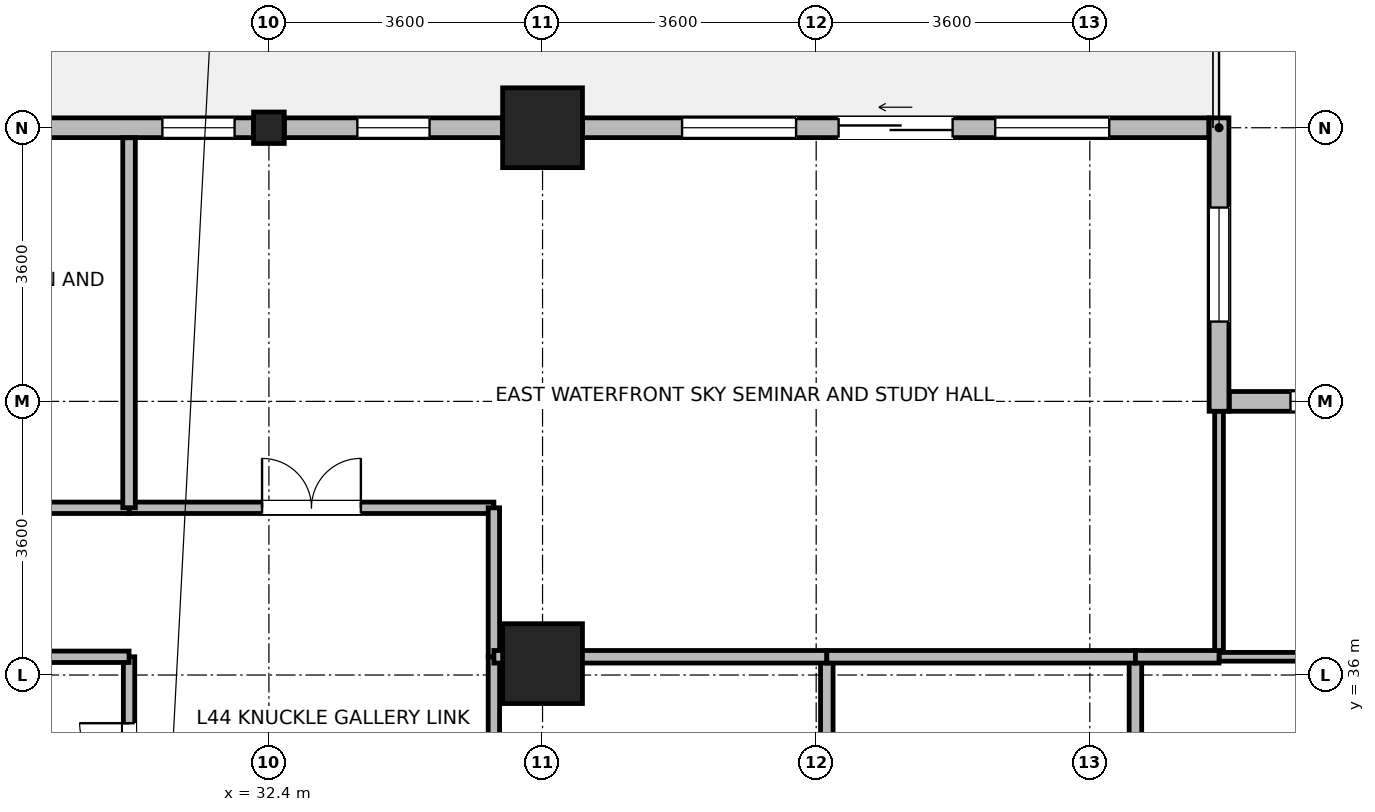
"""IFC4 building model, lengths in metres.
Left out: names, types, materials, properties, quantities, classifications, styles, units other than length and angle.
Written with IfcOpenShell. Run it as: python <this file> out.ifc"""

import sys

from ifc_helpers import new_model, si_unit, direction, frame, frame_2d, origin, origin_2d, place, context, subcontext, project, spatial, rectangle, i_section, extrude, source, transform, mapped, element, fill, save


model = new_model("IFC4")
c1 = context("Model", 3, precision=1e-05, world=origin(), true_north=direction((0.0, 1.0)))
c2 = subcontext(c1, "Body", "Model", "MODEL_VIEW")
j1 = project(units=[si_unit("LENGTHUNIT", "METRE"), si_unit("PLANEANGLEUNIT", "RADIAN")], contexts=[c1])
p1 = place(None, origin())
s1 = spatial("IfcSite", under=j1, at=p1, CompositionType="ELEMENT")
p2 = place(p1, origin())
s2 = spatial("IfcBuilding", under=s1, at=p2, CompositionType="ELEMENT")
p3 = place(p2, frame((0.0, 0.0, 173.5)))
s3 = spatial("IfcBuildingStorey", under=s2, at=p3, CompositionType="ELEMENT", Elevation=173.5)
m1 = source(origin(), c2, "Body", "SweptSolid", [
    extrude(rectangle(XDim=1.05, YDim=1.05, at=origin_2d()), origin(), (0.0, 0.0, 1.0), 3.7),
])
for number, where, z_axis, x_axis in (
    (1, (36.0, 43.2, 0.0), (0.0, 0.0, 1.0), (1.0, 0.0, 0.0)),
    (2, (36.0, 36.15, 0.0), (0.0, 0.0, 1.0), (1.0, 0.0, 0.0)),
):
    element("IfcColumn", number, at=place(p3, frame(where, z_axis=z_axis, x_axis=x_axis)), inside=s3, PredefinedType="COLUMN", context=c2, shape_type="MappedRepresentation", body=[
        mapped(m1, transform((0.0, 0.0, 0.0), x_axis=(1.0, 0.0, 0.0), y_axis=(0.0, 1.0, 0.0), z_axis=(0.0, 0.0, 1.0), scale=1.0)),
    ])
m2 = source(origin(), c2, "Body", "SweptSolid", [
    extrude(i_section(OverallWidth=0.404, OverallDepth=0.414, WebThickness=0.021, FlangeThickness=0.028, FilletRadius=0.015, at=origin_2d()), origin(), (0.0, 0.0, 1.0), 3.7),
])
p4 = place(p3, frame((32.4, 43.2, 0.0), z_axis=(0.0, 0.0, 1.0), x_axis=(1.0, 0.0, 0.0)))
e3 = element("IfcColumn", 3, at=p4, inside=s3, PredefinedType="COLUMN", context=c2, shape_type="MappedRepresentation", body=[
    mapped(m2, transform((0.0, 0.0, 0.0), x_axis=(1.0, 0.0, 0.0), y_axis=(0.0, 1.0, 0.0), z_axis=(0.0, 0.0, 1.0), scale=1.0)),
])
p5 = place(p3, frame((45.035, 39.6, 0.0), z_axis=(0.0, 0.0, 1.0), x_axis=(1.0, 0.0, 0.0)))
e4 = element("IfcWall", 4, at=p5, inside=s3, PredefinedType="STANDARD", context=c2, shape_type="SweptSolid", body=[
    extrude(rectangle(XDim=9.33, YDim=0.26, at=frame_2d((4.665, 0.0))), origin(), (0.0, 0.0, 1.0), 3.44),
])
p6 = place(p5, frame((0.805, 0.0, 0.85)))
e5 = element("IfcOpeningElement", 5, at=p6, cuts=e4, PredefinedType="OPENING", context=c2, shape_type="SweptSolid", body=[
    extrude(rectangle(XDim=1.5, YDim=1.85, at=frame_2d((0.75, 0.925))), frame((0.0, 0.14, 0.0), z_axis=(0.0, -1.0, 0.0), x_axis=(1.0, 0.0, 0.0)), (0.0, 0.0, 1.0), 0.28),
])
p7 = place(p5, frame((3.915, 0.0, 0.85)))
e6 = element("IfcOpeningElement", 6, at=p7, cuts=e4, PredefinedType="OPENING", context=c2, shape_type="SweptSolid", body=[
    extrude(rectangle(XDim=1.5, YDim=1.85, at=frame_2d((0.75, 0.925))), frame((0.0, 0.14, 0.0), z_axis=(0.0, -1.0, 0.0), x_axis=(1.0, 0.0, 0.0)), (0.0, 0.0, 1.0), 0.28),
])
p8 = place(p5, frame((7.025, 0.0, 0.85)))
e7 = element("IfcOpeningElement", 7, at=p8, cuts=e4, PredefinedType="OPENING", context=c2, shape_type="SweptSolid", body=[
    extrude(rectangle(XDim=1.5, YDim=1.85, at=frame_2d((0.75, 0.925))), frame((0.0, 0.14, 0.0), z_axis=(0.0, -1.0, 0.0), x_axis=(1.0, 0.0, 0.0)), (0.0, 0.0, 1.0), 0.28),
])
p9 = place(p3, frame((44.9, 43.33, 0.0), z_axis=(0.0, 0.0, 1.0), x_axis=(0.0, -1.0, 0.0)))
e8 = element("IfcWall", 8, at=p9, inside=s3, PredefinedType="STANDARD", context=c2, shape_type="SweptSolid", body=[
    extrude(rectangle(XDim=3.86, YDim=0.26, at=frame_2d((1.93, 0.0))), origin(), (0.0, 0.0, 1.0), 3.44),
])
p10 = place(p9, frame((1.18, 0.0, 0.85)))
e9 = element("IfcOpeningElement", 9, at=p10, cuts=e8, PredefinedType="OPENING", context=c2, shape_type="SweptSolid", body=[
    extrude(rectangle(XDim=1.5, YDim=1.85, at=frame_2d((0.75, 0.925))), frame((0.0, 0.14, 0.0), z_axis=(0.0, -1.0, 0.0), x_axis=(1.0, 0.0, 0.0)), (0.0, 0.0, 1.0), 0.28),
])
p11 = place(p3, frame((36.526, 43.2, 0.0), z_axis=(0.0, 0.0, 1.0), x_axis=(1.0, 0.0, 0.0)))
e10 = element("IfcWall", 10, at=p11, inside=s3, PredefinedType="STANDARD", context=c2, shape_type="SweptSolid", body=[
    extrude(rectangle(XDim=8.239, YDim=0.26, at=frame_2d((4.12, 0.0))), origin(), (0.0, 0.0, 1.0), 2.99),
])
p12 = place(p11, frame((3.369, 0.0, 0.0)))
e11 = element("IfcOpeningElement", 11, at=p12, cuts=e10, PredefinedType="OPENING", context=c2, shape_type="SweptSolid", body=[
    extrude(rectangle(XDim=1.5, YDim=2.15, at=frame_2d((0.75, 1.075))), frame((0.0, 0.14, 0.0), z_axis=(0.0, -1.0, 0.0), x_axis=(1.0, 0.0, 0.0)), (0.0, 0.0, 1.0), 0.28),
])
p13 = place(p11, frame((1.31, 0.0, 0.85)))
e12 = element("IfcOpeningElement", 12, at=p13, cuts=e10, PredefinedType="OPENING", context=c2, shape_type="SweptSolid", body=[
    extrude(rectangle(XDim=1.5, YDim=1.85, at=frame_2d((0.75, 0.925))), frame((0.0, 0.14, 0.0), z_axis=(0.0, -1.0, 0.0), x_axis=(1.0, 0.0, 0.0)), (0.0, 0.0, 1.0), 0.28),
])
p14 = place(p11, frame((5.429, 0.0, 0.85)))
e13 = element("IfcOpeningElement", 13, at=p14, cuts=e10, PredefinedType="OPENING", context=c2, shape_type="SweptSolid", body=[
    extrude(rectangle(XDim=1.5, YDim=1.85, at=frame_2d((0.75, 0.925))), frame((0.0, 0.14, 0.0), z_axis=(0.0, -1.0, 0.0), x_axis=(1.0, 0.0, 0.0)), (0.0, 0.0, 1.0), 0.28),
])
p15 = place(p3, frame((32.603, 43.2, 0.0), z_axis=(0.0, 0.0, 1.0), x_axis=(1.0, 0.0, 0.0)))
e14 = element("IfcWall", 14, at=p15, inside=s3, PredefinedType="STANDARD", context=c2, shape_type="SweptSolid", body=[
    extrude(rectangle(XDim=2.871, YDim=0.26, at=frame_2d((1.436, 0.0))), origin(), (0.0, 0.0, 1.0), 2.99),
])
p16 = place(p15, frame((0.96, 0.0, 0.85)))
e15 = element("IfcOpeningElement", 15, at=p16, cuts=e14, PredefinedType="OPENING", context=c2, shape_type="SweptSolid", body=[
    extrude(rectangle(XDim=0.95, YDim=1.75, at=frame_2d((0.475, 0.875))), frame((0.0, 0.14, 0.0), z_axis=(0.0, -1.0, 0.0), x_axis=(1.0, 0.0, 0.0)), (0.0, 0.0, 1.0), 0.28),
])
p17 = place(p3, frame((29.326, 43.2, 0.0), z_axis=(0.0, 0.0, 1.0), x_axis=(1.0, 0.0, 0.0)))
e16 = element("IfcWall", 16, at=p17, inside=s3, PredefinedType="STANDARD", context=c2, shape_type="SweptSolid", body=[
    extrude(rectangle(XDim=2.871, YDim=0.26, at=frame_2d((1.436, 0.0))), origin(), (0.0, 0.0, 1.0), 2.99),
])
p18 = place(p17, frame((1.673, 0.0, 0.85)))
e17 = element("IfcOpeningElement", 17, at=p18, cuts=e16, PredefinedType="OPENING", context=c2, shape_type="SweptSolid", body=[
    extrude(rectangle(XDim=0.95, YDim=1.75, at=frame_2d((0.475, 0.875))), frame((0.0, 0.14, 0.0), z_axis=(0.0, -1.0, 0.0), x_axis=(1.0, 0.0, 0.0)), (0.0, 0.0, 1.0), 0.28),
])
p19 = place(p3, frame((35.36, 28.56, 0.0), z_axis=(0.0, 0.0, 1.0), x_axis=(0.0, 1.0, 0.0)))
e18 = element("IfcWall", 18, at=p19, inside=s3, PredefinedType="PARTITIONING", context=c2, shape_type="SweptSolid", body=[
    extrude(rectangle(XDim=7.68, YDim=0.15, at=frame_2d((3.84, 0.0))), origin(), (0.0, 0.0, 1.0), 3.44),
])
p20 = place(p19, frame((3.19, 0.0, 0.0)))
e19 = element("IfcOpeningElement", 19, at=p20, cuts=e18, PredefinedType="OPENING", context=c2, shape_type="SweptSolid", body=[
    extrude(rectangle(XDim=1.3, YDim=2.12, at=frame_2d((0.65, 1.06))), frame((0.0, 0.085, 0.0), z_axis=(0.0, -1.0, 0.0), x_axis=(1.0, 0.0, 0.0)), (0.0, 0.0, 1.0), 0.17),
])
p21 = place(p3, frame((30.56, 38.2, 0.0), z_axis=(0.0, 0.0, 1.0), x_axis=(1.0, 0.0, 0.0)))
e20 = element("IfcWall", 20, at=p21, inside=s3, PredefinedType="PARTITIONING", context=c2, shape_type="SweptSolid", body=[
    extrude(rectangle(XDim=4.8, YDim=0.15, at=frame_2d((2.4, 0.0))), origin(), (0.0, 0.0, 1.0), 3.44),
])
p22 = place(p21, frame((1.75, 0.0, 0.0)))
e21 = element("IfcOpeningElement", 21, at=p22, cuts=e20, PredefinedType="OPENING", context=c2, shape_type="SweptSolid", body=[
    extrude(rectangle(XDim=1.3, YDim=2.12, at=frame_2d((0.65, 1.06))), frame((0.0, 0.085, 0.0), z_axis=(0.0, -1.0, 0.0), x_axis=(1.0, 0.0, 0.0)), (0.0, 0.0, 1.0), 0.17),
])
p23 = place(p3, frame((25.82, 38.2, 0.0), z_axis=(0.0, 0.0, 1.0), x_axis=(1.0, 0.0, 0.0)))
e22 = element("IfcWall", 22, at=p23, inside=s3, PredefinedType="PARTITIONING", context=c2, shape_type="SweptSolid", body=[
    extrude(rectangle(XDim=4.74, YDim=0.15, at=frame_2d((2.37, 0.0))), origin(), (0.0, 0.0, 1.0), 3.44),
])
p24 = place(p23, frame((1.92, 0.0, 0.0)))
e23 = element("IfcOpeningElement", 23, at=p24, cuts=e22, PredefinedType="OPENING", context=c2, shape_type="SweptSolid", body=[
    extrude(rectangle(XDim=0.9, YDim=2.08, at=frame_2d((0.45, 1.04))), frame((0.0, 0.085, 0.0), z_axis=(0.0, -1.0, 0.0), x_axis=(1.0, 0.0, 0.0)), (0.0, 0.0, 1.0), 0.17),
])
p25 = place(p3, frame((30.56, 33.7, 0.0), z_axis=(0.0, 0.0, 1.0), x_axis=(0.0, 1.0, 0.0)))
e24 = element("IfcWall", 24, at=p25, inside=s3, PredefinedType="PARTITIONING", context=c2, shape_type="SweptSolid", body=[
    extrude(rectangle(XDim=2.54, YDim=0.15, at=frame_2d((1.27, 0.0))), origin(), (0.0, 0.0, 1.0), 3.44),
])
p26 = place(p25, frame((0.366, 0.0, 0.0)))
e25 = element("IfcOpeningElement", 25, at=p26, cuts=e24, PredefinedType="OPENING", context=c2, shape_type="SweptSolid", body=[
    extrude(rectangle(XDim=1.3, YDim=2.12, at=frame_2d((0.65, 1.06))), frame((0.0, 0.085, 0.0), z_axis=(0.0, -1.0, 0.0), x_axis=(1.0, 0.0, 0.0)), (0.0, 0.0, 1.0), 0.17),
])
p27 = place(p3, frame((35.36, 36.24, 0.0), z_axis=(0.0, 0.0, 1.0), x_axis=(0.0, 1.0, 0.0)))
e26 = element("IfcWall", 26, at=p27, inside=s3, PredefinedType="PARTITIONING", context=c2, shape_type="SweptSolid", body=[
    extrude(rectangle(XDim=1.96, YDim=0.15, at=frame_2d((0.98, 0.0))), origin(), (0.0, 0.0, 1.0), 3.44),
])
p28 = place(p3, frame((29.325, 36.24, 0.0), z_axis=(0.0, 0.0, 1.0), x_axis=(1.0, 0.0, 0.0)))
e27 = element("IfcWall", 27, at=p28, inside=s3, PredefinedType="PARTITIONING", context=c2, shape_type="SweptSolid", body=[
    extrude(rectangle(XDim=1.235, YDim=0.15, at=frame_2d((0.618, 0.0))), origin(), (0.0, 0.0, 1.0), 2.84),
])
for number, where, z_axis, x_axis in (
    (28, (39.74, 28.56, 0.0), (0.0, 0.0, 1.0), (0.0, 1.0, 0.0)),
    (29, (43.8, 28.56, 0.0), (0.0, 0.0, 1.0), (0.0, 1.0, 0.0)),
):
    element("IfcWall", number, at=place(p3, frame(where, z_axis=z_axis, x_axis=x_axis)), inside=s3, PredefinedType="PARTITIONING", context=c2, shape_type="SweptSolid", body=[
        extrude(rectangle(XDim=7.68, YDim=0.165, at=frame_2d((3.84, 0.0))), origin(), (0.0, 0.0, 1.0), 3.44),
    ])
p29 = place(p3, frame((44.9, 36.24, 0.0), z_axis=(0.0, 0.0, 1.0), x_axis=(0.0, 1.0, 0.0)))
e30 = element("IfcWall", 30, at=p29, inside=s3, PredefinedType="PARTITIONING", context=c2, shape_type="SweptSolid", body=[
    extrude(rectangle(XDim=3.228, YDim=0.115, at=frame_2d((1.614, 0.0))), origin(), (0.0, 0.0, 1.0), 3.44),
])
p30 = place(p3, frame((30.56, 38.2, 0.0), z_axis=(0.0, 0.0, 1.0), x_axis=(0.0, 1.0, 0.0)))
e31 = element("IfcWall", 31, at=p30, inside=s3, PredefinedType="PARTITIONING", context=c2, shape_type="SweptSolid", body=[
    extrude(rectangle(XDim=4.868, YDim=0.165, at=frame_2d((2.434, 0.0))), origin(), (0.0, 0.0, 1.0), 3.44),
])
p31 = place(p3, frame((35.36, 36.24, 0.0), z_axis=(0.0, 0.0, 1.0), x_axis=(1.0, 0.0, 0.0)))
e32 = element("IfcWall", 32, at=p31, inside=s3, PredefinedType="PARTITIONING", context=c2, shape_type="SweptSolid", body=[
    extrude(rectangle(XDim=4.38, YDim=0.165, at=frame_2d((2.19, 0.0))), origin(), (0.0, 0.0, 1.0), 2.84),
])
p32 = place(p3, frame((39.74, 36.24, 0.0), z_axis=(0.0, 0.0, 1.0), x_axis=(1.0, 0.0, 0.0)))
e33 = element("IfcWall", 33, at=p32, inside=s3, PredefinedType="PARTITIONING", context=c2, shape_type="SweptSolid", body=[
    extrude(rectangle(XDim=4.06, YDim=0.165, at=frame_2d((2.03, 0.0))), origin(), (0.0, 0.0, 1.0), 2.84),
])
p33 = place(p3, frame((44.9, 36.24, 0.0), z_axis=(0.0, 0.0, 1.0), x_axis=(1.0, 0.0, 0.0)))
e34 = element("IfcWall", 34, at=p33, inside=s3, PredefinedType="PARTITIONING", context=c2, shape_type="SweptSolid", body=[
    extrude(rectangle(XDim=1.375, YDim=0.115, at=frame_2d((0.688, 0.0))), origin(), (0.0, 0.0, 1.0), 2.84),
])
p34 = place(p3, frame((43.8, 36.24, 0.0), z_axis=(0.0, 0.0, 1.0), x_axis=(1.0, 0.0, 0.0)))
e35 = element("IfcWall", 35, at=p34, inside=s3, PredefinedType="PARTITIONING", context=c2, shape_type="SweptSolid", body=[
    extrude(rectangle(XDim=1.1, YDim=0.165, at=frame_2d((0.55, 0.0))), origin(), (0.0, 0.0, 1.0), 2.84),
])
p35 = place(p6, origin())
e36 = element("IfcWindow", 36, at=p35, inside=s3, PartitioningType="SINGLE_PANEL", PredefinedType="WINDOW", context=c2, shape_type="SweptSolid", body=[
    extrude(rectangle(XDim=1.5, YDim=1.85, at=frame_2d((0.75, 0.925))), frame((0.0, 0.03, 0.0), z_axis=(0.0, -1.0, 0.0), x_axis=(1.0, 0.0, 0.0)), (0.0, 0.0, 1.0), 0.06),
])
fill(e5, e36)
p36 = place(p10, origin())
e37 = element("IfcWindow", 37, at=p36, inside=s3, PartitioningType="SINGLE_PANEL", PredefinedType="WINDOW", context=c2, shape_type="SweptSolid", body=[
    extrude(rectangle(XDim=1.5, YDim=1.85, at=frame_2d((0.75, 0.925))), frame((0.0, 0.03, 0.0), z_axis=(0.0, -1.0, 0.0), x_axis=(1.0, 0.0, 0.0)), (0.0, 0.0, 1.0), 0.06),
])
fill(e9, e37)
p37 = place(p12, origin())
e38 = element("IfcDoor", 38, at=p37, inside=s3, OperationType="SLIDING_TO_LEFT", PredefinedType="DOOR", context=c2, shape_type="SweptSolid", body=[
    extrude(rectangle(XDim=1.5, YDim=2.15, at=frame_2d((0.75, 1.075))), frame((0.0, 0.025, 0.0), z_axis=(0.0, -1.0, 0.0), x_axis=(1.0, 0.0, 0.0)), (0.0, 0.0, 1.0), 0.05),
])
fill(e11, e38)
p38 = place(p13, origin())
e39 = element("IfcWindow", 39, at=p38, inside=s3, PartitioningType="SINGLE_PANEL", PredefinedType="WINDOW", context=c2, shape_type="SweptSolid", body=[
    extrude(rectangle(XDim=1.5, YDim=1.85, at=frame_2d((0.75, 0.925))), frame((0.0, 0.03, 0.0), z_axis=(0.0, -1.0, 0.0), x_axis=(1.0, 0.0, 0.0)), (0.0, 0.0, 1.0), 0.06),
])
fill(e12, e39)
p39 = place(p14, origin())
e40 = element("IfcWindow", 40, at=p39, inside=s3, PartitioningType="SINGLE_PANEL", PredefinedType="WINDOW", context=c2, shape_type="SweptSolid", body=[
    extrude(rectangle(XDim=1.5, YDim=1.85, at=frame_2d((0.75, 0.925))), frame((0.0, 0.03, 0.0), z_axis=(0.0, -1.0, 0.0), x_axis=(1.0, 0.0, 0.0)), (0.0, 0.0, 1.0), 0.06),
])
fill(e13, e40)
p40 = place(p16, origin())
e41 = element("IfcWindow", 41, at=p40, inside=s3, PartitioningType="SINGLE_PANEL", PredefinedType="WINDOW", context=c2, shape_type="SweptSolid", body=[
    extrude(rectangle(XDim=0.95, YDim=1.75, at=frame_2d((0.475, 0.875))), frame((0.0, 0.03, 0.0), z_axis=(0.0, -1.0, 0.0), x_axis=(1.0, 0.0, 0.0)), (0.0, 0.0, 1.0), 0.06),
])
fill(e15, e41)
p41 = place(p18, origin())
e42 = element("IfcWindow", 42, at=p41, inside=s3, PartitioningType="SINGLE_PANEL", PredefinedType="WINDOW", context=c2, shape_type="SweptSolid", body=[
    extrude(rectangle(XDim=0.95, YDim=1.75, at=frame_2d((0.475, 0.875))), frame((0.0, 0.03, 0.0), z_axis=(0.0, -1.0, 0.0), x_axis=(1.0, 0.0, 0.0)), (0.0, 0.0, 1.0), 0.06),
])
fill(e17, e42)
p42 = place(p22, origin())
e43 = element("IfcDoor", 43, at=p42, inside=s3, OperationType="DOUBLE_DOOR_SINGLE_SWING", PredefinedType="DOOR", context=c2, shape_type="SweptSolid", body=[
    extrude(rectangle(XDim=1.3, YDim=2.12, at=frame_2d((0.65, 1.06))), frame((0.0, 0.025, 0.0), z_axis=(0.0, -1.0, 0.0), x_axis=(1.0, 0.0, 0.0)), (0.0, 0.0, 1.0), 0.05),
])
fill(e21, e43)
p43 = place(p26, origin())
e44 = element("IfcDoor", 44, at=p43, inside=s3, OperationType="DOUBLE_DOOR_SINGLE_SWING", PredefinedType="DOOR", context=c2, shape_type="SweptSolid", body=[
    extrude(rectangle(XDim=1.3, YDim=2.12, at=frame_2d((0.65, 1.06))), frame((0.0, 0.025, 0.0), z_axis=(0.0, -1.0, 0.0), x_axis=(1.0, 0.0, 0.0)), (0.0, 0.0, 1.0), 0.05),
])
fill(e25, e44)
save(model, sys.argv[1])
